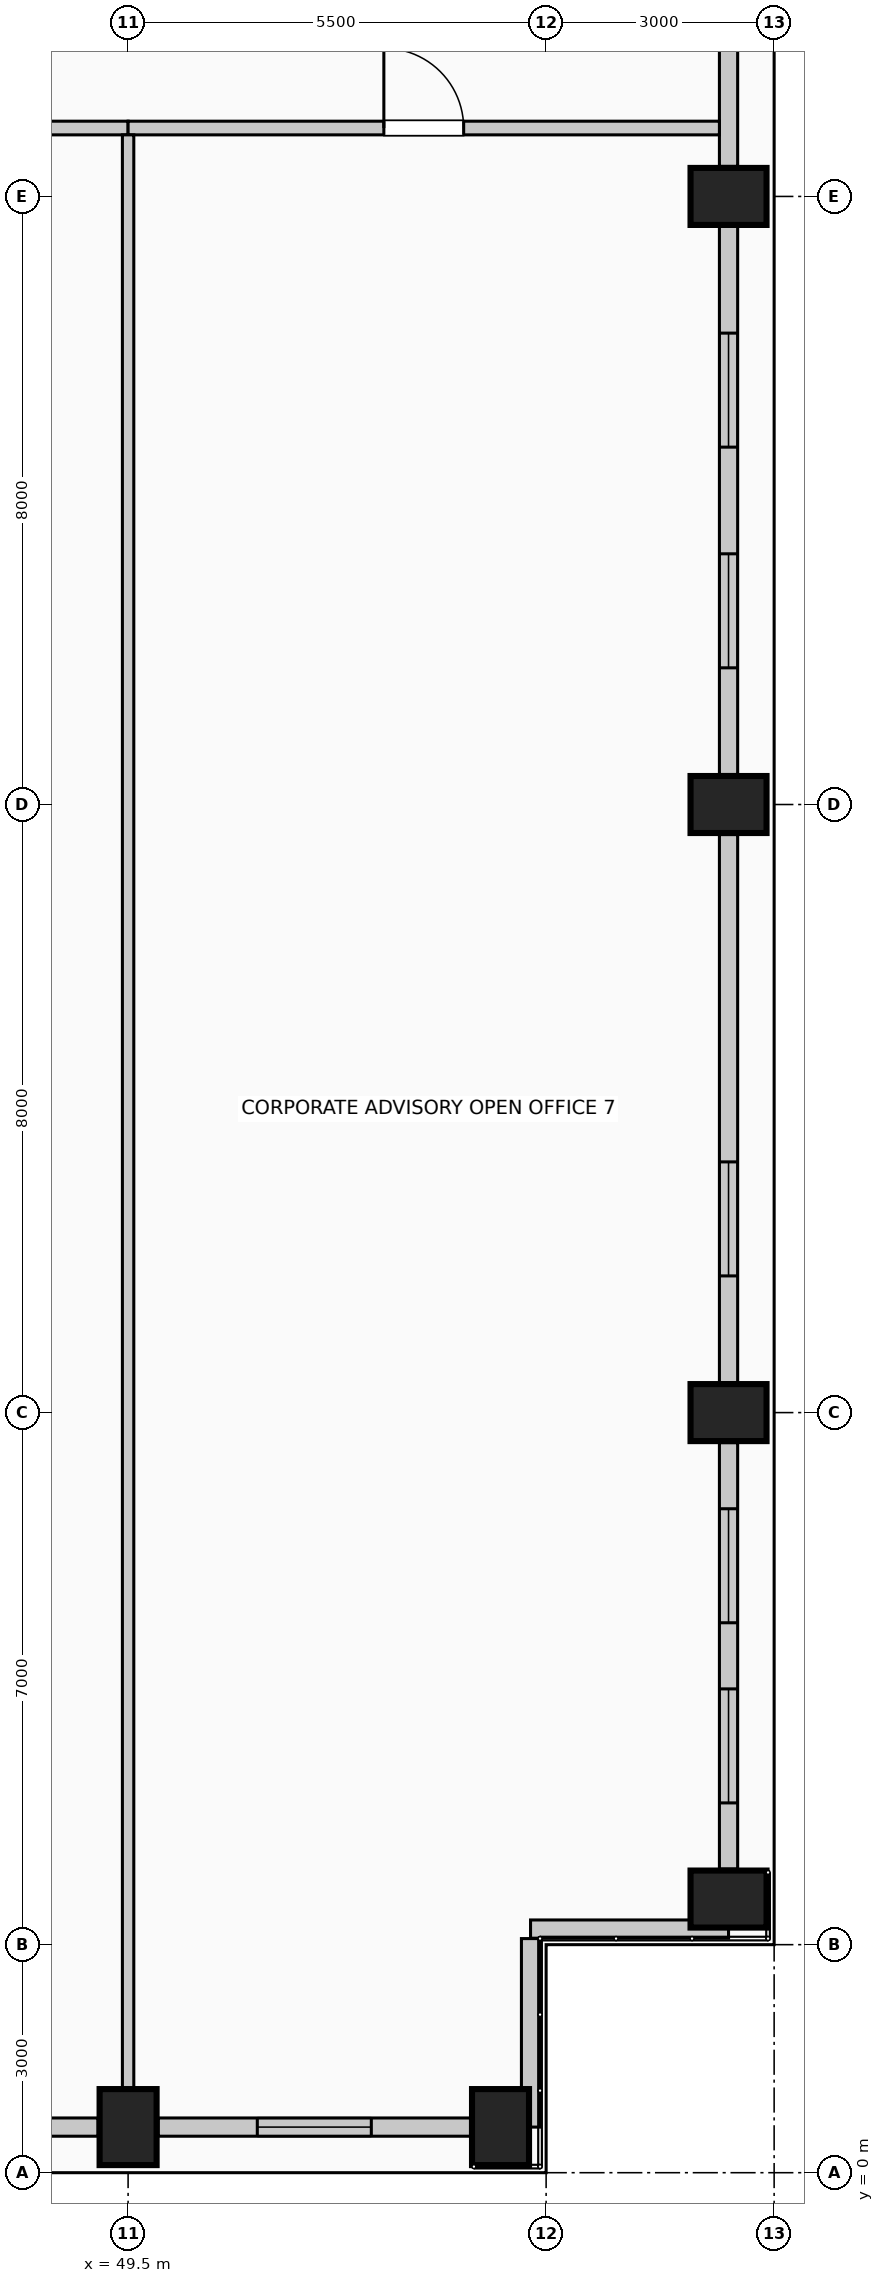
"""IFC4 building model, lengths in metres.
Left out: names, types, materials, properties, quantities, classifications, styles, units other than length and angle.
Written with IfcOpenShell. Run it as: python <this file> out.ifc"""

import sys

from ifc_helpers import new_model, si_unit, direction, frame, frame_2d, origin, origin_2d, place, context, subcontext, project, spatial, rectangle, extrude, element, fill, save


model = new_model("IFC4")
c1 = context("Model", 3, precision=1e-05, world=origin(), true_north=direction((0.0, 1.0)))
c2 = subcontext(c1, "Body", "Model", "MODEL_VIEW")
j1 = project(units=[si_unit("LENGTHUNIT", "METRE"), si_unit("PLANEANGLEUNIT", "RADIAN")], contexts=[c1])
p1 = place(None, origin())
s1 = spatial("IfcSite", under=j1, at=p1, CompositionType="ELEMENT")
p2 = place(p1, origin())
s2 = spatial("IfcBuilding", under=s1, at=p2, CompositionType="ELEMENT")
p3 = place(p2, frame((0.0, 0.0, 268.6)))
s3 = spatial("IfcBuildingStorey", under=s2, at=p3, CompositionType="ELEMENT", Elevation=268.6)
for number, where, z_axis, x_axis in (
    (1, (49.5, 0.6, 0.0), (0.0, 0.0, 1.0), (1.0, 0.0, 0.0)),
    (2, (54.4, 0.6, 0.0), (0.0, 0.0, 1.0), (1.0, 0.0, 0.0)),
    (3, (57.4, 3.6, 0.0), (0.0, 0.0, 1.0), (0.0, 1.0, 0.0)),
    (4, (57.4, 10.0, 0.0), (0.0, 0.0, 1.0), (0.0, 1.0, 0.0)),
    (5, (57.4, 18.0, 0.0), (0.0, 0.0, 1.0), (0.0, 1.0, 0.0)),
    (6, (57.4, 26.0, 0.0), (0.0, 0.0, 1.0), (0.0, 1.0, 0.0)),
):
    element("IfcColumn", number, at=place(p3, frame(where, z_axis=z_axis, x_axis=x_axis)), inside=s3, PredefinedType="COLUMN", context=c2, shape_type="SweptSolid", body=[
        extrude(rectangle(XDim=0.75, YDim=1.0, at=origin_2d()), origin(), (0.0, 0.0, 1.0), 4.0),
    ])
p4 = place(p3, frame((49.105, 0.6, 0.0), z_axis=(0.0, 0.0, 1.0), x_axis=(-1.0, 0.0, 0.0)))
e7 = element("IfcWall", 7, at=p4, inside=s3, PredefinedType="SOLIDWALL", context=c2, shape_type="SweptSolid", body=[
    extrude(rectangle(XDim=4.71, YDim=0.24, at=frame_2d((2.355, 0.0))), origin(), (0.0, 0.0, 1.0), 3.0),
])
p5 = place(p3, frame((54.005, 0.6, 0.0), z_axis=(0.0, 0.0, 1.0), x_axis=(-1.0, 0.0, 0.0)))
e8 = element("IfcWall", 8, at=p5, inside=s3, PredefinedType="SOLIDWALL", context=c2, shape_type="SweptSolid", body=[
    extrude(rectangle(XDim=4.11, YDim=0.24, at=frame_2d((2.055, 0.0))), origin(), (0.0, 0.0, 1.0), 3.0),
])
p6 = place(p5, frame((1.305, 0.0, 0.42)))
e9 = element("IfcOpeningElement", 9, at=p6, cuts=e8, PredefinedType="OPENING", context=c2, shape_type="SweptSolid", body=[
    extrude(rectangle(XDim=1.5, YDim=2.2, at=frame_2d((0.75, 1.1))), frame((0.0, 0.13, 0.0), z_axis=(0.0, -1.0, 0.0), x_axis=(1.0, 0.0, 0.0)), (0.0, 0.0, 1.0), 0.26),
])
p7 = place(p3, frame((57.4, 9.605, 0.0), z_axis=(0.0, 0.0, 1.0), x_axis=(0.0, -1.0, 0.0)))
e10 = element("IfcWall", 10, at=p7, inside=s3, PredefinedType="SOLIDWALL", context=c2, shape_type="SweptSolid", body=[
    extrude(rectangle(XDim=5.61, YDim=0.24, at=frame_2d((2.805, 0.0))), origin(), (0.0, 0.0, 1.0), 3.0),
])
p8 = place(p7, frame((0.87, 0.0, 0.42)))
e11 = element("IfcOpeningElement", 11, at=p8, cuts=e10, PredefinedType="OPENING", context=c2, shape_type="SweptSolid", body=[
    extrude(rectangle(XDim=1.5, YDim=2.2, at=frame_2d((0.75, 1.1))), frame((0.0, 0.13, 0.0), z_axis=(0.0, -1.0, 0.0), x_axis=(1.0, 0.0, 0.0)), (0.0, 0.0, 1.0), 0.26),
])
p9 = place(p7, frame((3.24, 0.0, 0.42)))
e12 = element("IfcOpeningElement", 12, at=p9, cuts=e10, PredefinedType="OPENING", context=c2, shape_type="SweptSolid", body=[
    extrude(rectangle(XDim=1.5, YDim=2.2, at=frame_2d((0.75, 1.1))), frame((0.0, 0.13, 0.0), z_axis=(0.0, -1.0, 0.0), x_axis=(1.0, 0.0, 0.0)), (0.0, 0.0, 1.0), 0.26),
])
p10 = place(p3, frame((57.4, 17.605, 0.0), z_axis=(0.0, 0.0, 1.0), x_axis=(0.0, -1.0, 0.0)))
e13 = element("IfcWall", 13, at=p10, inside=s3, PredefinedType="SOLIDWALL", context=c2, shape_type="SweptSolid", body=[
    extrude(rectangle(XDim=7.21, YDim=0.24, at=frame_2d((3.605, 0.0))), origin(), (0.0, 0.0, 1.0), 3.0),
])
p11 = place(p10, frame((4.307, 0.0, 0.42)))
e14 = element("IfcOpeningElement", 14, at=p11, cuts=e13, PredefinedType="OPENING", context=c2, shape_type="SweptSolid", body=[
    extrude(rectangle(XDim=1.5, YDim=2.2, at=frame_2d((0.75, 1.1))), frame((0.0, 0.13, 0.0), z_axis=(0.0, -1.0, 0.0), x_axis=(1.0, 0.0, 0.0)), (0.0, 0.0, 1.0), 0.26),
])
p12 = place(p3, frame((57.4, 25.605, 0.0), z_axis=(0.0, 0.0, 1.0), x_axis=(0.0, -1.0, 0.0)))
e15 = element("IfcWall", 15, at=p12, inside=s3, PredefinedType="SOLIDWALL", context=c2, shape_type="SweptSolid", body=[
    extrude(rectangle(XDim=7.21, YDim=0.24, at=frame_2d((3.605, 0.0))), origin(), (0.0, 0.0, 1.0), 3.0),
])
p13 = place(p12, frame((1.403, 0.0, 0.42)))
e16 = element("IfcOpeningElement", 16, at=p13, cuts=e15, PredefinedType="OPENING", context=c2, shape_type="SweptSolid", body=[
    extrude(rectangle(XDim=1.5, YDim=2.2, at=frame_2d((0.75, 1.1))), frame((0.0, 0.13, 0.0), z_axis=(0.0, -1.0, 0.0), x_axis=(1.0, 0.0, 0.0)), (0.0, 0.0, 1.0), 0.26),
])
p14 = place(p12, frame((4.307, 0.0, 0.42)))
e17 = element("IfcOpeningElement", 17, at=p14, cuts=e15, PredefinedType="OPENING", context=c2, shape_type="SweptSolid", body=[
    extrude(rectangle(XDim=1.5, YDim=2.2, at=frame_2d((0.75, 1.1))), frame((0.0, 0.13, 0.0), z_axis=(0.0, -1.0, 0.0), x_axis=(1.0, 0.0, 0.0)), (0.0, 0.0, 1.0), 0.26),
])
p15 = place(p3, frame((57.4, 33.605, 0.0), z_axis=(0.0, 0.0, 1.0), x_axis=(0.0, -1.0, 0.0)))
e18 = element("IfcWall", 18, at=p15, inside=s3, PredefinedType="SOLIDWALL", context=c2, shape_type="SweptSolid", body=[
    extrude(rectangle(XDim=7.21, YDim=0.24, at=frame_2d((3.605, 0.0))), origin(), (0.0, 0.0, 1.0), 3.0),
])
p16 = place(p3, frame((57.4, 3.205, 0.0), z_axis=(0.0, 0.0, 1.0), x_axis=(-1.0, 0.0, 0.0)))
e19 = element("IfcWall", 19, at=p16, inside=s3, PredefinedType="SOLIDWALL", context=c2, shape_type="SweptSolid", body=[
    extrude(rectangle(XDim=2.605, YDim=0.24, at=frame_2d((1.302, 0.0))), origin(), (0.0, 0.0, 1.0), 3.75),
])
p17 = place(p3, frame((54.795, 3.08, 0.0), z_axis=(0.0, 0.0, 1.0), x_axis=(0.0, -1.0, 0.0)))
e20 = element("IfcWall", 20, at=p17, inside=s3, PredefinedType="SOLIDWALL", context=c2, shape_type="SweptSolid", body=[
    extrude(rectangle(XDim=2.48, YDim=0.24, at=frame_2d((1.24, 0.0))), origin(), (0.0, 0.0, 1.0), 3.75),
])
p18 = place(p3, frame((39.52, 26.9, 0.0), z_axis=(0.0, 0.0, 1.0), x_axis=(1.0, 0.0, 0.0)))
e21 = element("IfcWall", 21, at=p18, inside=s3, PredefinedType="PARTITIONING", context=c2, shape_type="SweptSolid", body=[
    extrude(rectangle(XDim=9.98, YDim=0.18, at=frame_2d((4.99, 0.0))), origin(), (0.0, 0.0, 1.0), 3.75),
])
p19 = place(p18, frame((4.515, 0.0, 0.0)))
e22 = element("IfcOpeningElement", 22, at=p19, cuts=e21, PredefinedType="OPENING", context=c2, shape_type="SweptSolid", body=[
    extrude(rectangle(XDim=0.95, YDim=2.15, at=frame_2d((0.475, 1.075))), frame((0.0, 0.1, 0.0), z_axis=(0.0, -1.0, 0.0), x_axis=(1.0, 0.0, 0.0)), (0.0, 0.0, 1.0), 0.2),
])
p20 = place(p3, frame((49.5, 26.9, 0.0), z_axis=(0.0, 0.0, 1.0), x_axis=(1.0, 0.0, 0.0)))
e23 = element("IfcWall", 23, at=p20, inside=s3, PredefinedType="PARTITIONING", context=c2, shape_type="SweptSolid", body=[
    extrude(rectangle(XDim=7.78, YDim=0.18, at=frame_2d((3.89, 0.0))), origin(), (0.0, 0.0, 1.0), 3.75),
])
p21 = place(p20, frame((3.365, 0.0, 0.0)))
e24 = element("IfcOpeningElement", 24, at=p21, cuts=e23, PredefinedType="OPENING", context=c2, shape_type="SweptSolid", body=[
    extrude(rectangle(XDim=1.05, YDim=2.15, at=frame_2d((0.525, 1.075))), frame((0.0, 0.1, 0.0), z_axis=(0.0, -1.0, 0.0), x_axis=(1.0, 0.0, 0.0)), (0.0, 0.0, 1.0), 0.2),
])
p22 = place(p3, frame((49.5, 1.1, 0.0), z_axis=(0.0, 0.0, 1.0), x_axis=(0.0, 1.0, 0.0)))
e25 = element("IfcWall", 25, at=p22, inside=s3, PredefinedType="PARTITIONING", context=c2, shape_type="SweptSolid", body=[
    extrude(rectangle(XDim=25.71, YDim=0.15, at=frame_2d((12.855, 0.0))), origin(), (0.0, 0.0, 1.0), 3.75),
])
p23 = place(p6, origin())
e26 = element("IfcWindow", 26, at=p23, inside=s3, PartitioningType="SINGLE_PANEL", PredefinedType="WINDOW", context=c2, shape_type="SweptSolid", body=[
    extrude(rectangle(XDim=1.5, YDim=2.2, at=frame_2d((0.75, 1.1))), frame((0.0, 0.03, 0.0), z_axis=(0.0, -1.0, 0.0), x_axis=(1.0, 0.0, 0.0)), (0.0, 0.0, 1.0), 0.06),
])
fill(e9, e26)
p24 = place(p8, origin())
e27 = element("IfcWindow", 27, at=p24, inside=s3, PartitioningType="SINGLE_PANEL", PredefinedType="WINDOW", context=c2, shape_type="SweptSolid", body=[
    extrude(rectangle(XDim=1.5, YDim=2.2, at=frame_2d((0.75, 1.1))), frame((0.0, 0.03, 0.0), z_axis=(0.0, -1.0, 0.0), x_axis=(1.0, 0.0, 0.0)), (0.0, 0.0, 1.0), 0.06),
])
fill(e11, e27)
p25 = place(p9, origin())
e28 = element("IfcWindow", 28, at=p25, inside=s3, PartitioningType="SINGLE_PANEL", PredefinedType="WINDOW", context=c2, shape_type="SweptSolid", body=[
    extrude(rectangle(XDim=1.5, YDim=2.2, at=frame_2d((0.75, 1.1))), frame((0.0, 0.03, 0.0), z_axis=(0.0, -1.0, 0.0), x_axis=(1.0, 0.0, 0.0)), (0.0, 0.0, 1.0), 0.06),
])
fill(e12, e28)
p26 = place(p11, origin())
e29 = element("IfcWindow", 29, at=p26, inside=s3, PartitioningType="SINGLE_PANEL", PredefinedType="WINDOW", context=c2, shape_type="SweptSolid", body=[
    extrude(rectangle(XDim=1.5, YDim=2.2, at=frame_2d((0.75, 1.1))), frame((0.0, 0.03, 0.0), z_axis=(0.0, -1.0, 0.0), x_axis=(1.0, 0.0, 0.0)), (0.0, 0.0, 1.0), 0.06),
])
fill(e14, e29)
p27 = place(p13, origin())
e30 = element("IfcWindow", 30, at=p27, inside=s3, PartitioningType="SINGLE_PANEL", PredefinedType="WINDOW", context=c2, shape_type="SweptSolid", body=[
    extrude(rectangle(XDim=1.5, YDim=2.2, at=frame_2d((0.75, 1.1))), frame((0.0, 0.03, 0.0), z_axis=(0.0, -1.0, 0.0), x_axis=(1.0, 0.0, 0.0)), (0.0, 0.0, 1.0), 0.06),
])
fill(e16, e30)
p28 = place(p14, origin())
e31 = element("IfcWindow", 31, at=p28, inside=s3, PartitioningType="SINGLE_PANEL", PredefinedType="WINDOW", context=c2, shape_type="SweptSolid", body=[
    extrude(rectangle(XDim=1.5, YDim=2.2, at=frame_2d((0.75, 1.1))), frame((0.0, 0.03, 0.0), z_axis=(0.0, -1.0, 0.0), x_axis=(1.0, 0.0, 0.0)), (0.0, 0.0, 1.0), 0.06),
])
fill(e17, e31)
p29 = place(p21, origin())
e32 = element("IfcDoor", 32, at=p29, inside=s3, OperationType="SINGLE_SWING_LEFT", PredefinedType="DOOR", context=c2, shape_type="SweptSolid", body=[
    extrude(rectangle(XDim=1.05, YDim=2.15, at=frame_2d((0.525, 1.075))), frame((0.0, 0.025, 0.0), z_axis=(0.0, -1.0, 0.0), x_axis=(1.0, 0.0, 0.0)), (0.0, 0.0, 1.0), 0.05),
])
fill(e24, e32)
save(model, sys.argv[1])
